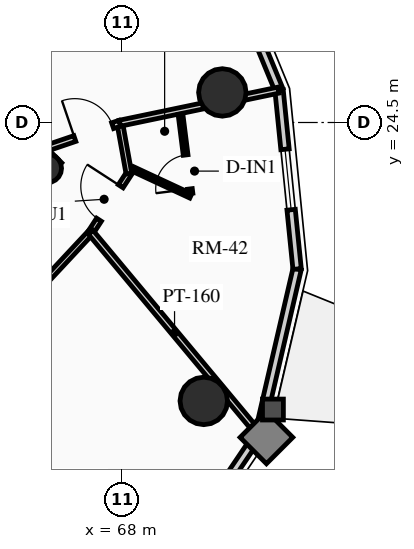
"""IFC4 building model, lengths in metres.
Left out: names, types, materials, properties, quantities, classifications, styles, units other than length and angle.
Written with IfcOpenShell. Run it as: python <this file> out.ifc"""

import sys

from ifc_helpers import new_model, si_unit, direction, frame, frame_2d, origin, origin_2d, place, context, subcontext, project, spatial, rectangle, circle, hollow_circle, extrude, source, transform, mapped, element, fill, save


model = new_model("IFC4")
c1 = context("Model", 3, precision=1e-05, world=origin(), true_north=direction((0.0, 1.0)))
c2 = subcontext(c1, "Body", "Model", "MODEL_VIEW")
j1 = project(units=[si_unit("LENGTHUNIT", "METRE"), si_unit("PLANEANGLEUNIT", "RADIAN")], contexts=[c1])
p1 = place(None, origin())
s1 = spatial("IfcSite", under=j1, at=p1, CompositionType="ELEMENT")
p2 = place(p1, origin())
s2 = spatial("IfcBuilding", under=s1, at=p2, CompositionType="ELEMENT")
p3 = place(p2, frame((0.0, 0.0, 169.06)))
s3 = spatial("IfcBuildingStorey", under=s2, at=p3, CompositionType="ELEMENT", Elevation=169.06)
p4 = place(p3, frame((66.268, 23.298, 0.0), z_axis=(0.0, 0.0, 1.0), x_axis=(-0.707106781187, 0.707106781187, 0.0)))
e1 = element("IfcWall", 1, at=p4, inside=s3, PredefinedType="SHEAR", context=c2, shape_type="SweptSolid", body=[
    extrude(rectangle(XDim=14.1, YDim=0.4, at=frame_2d((7.05, 0.0))), origin(), (0.0, 0.0, 1.0), 2.91),
])
p5 = place(p3, frame((58.561, 15.873, 0.0), z_axis=(0.0, 0.0, 1.0), x_axis=(0.707106781187, 0.707106781187, 0.0)))
e2 = element("IfcWall", 2, at=p5, inside=s3, PredefinedType="SHEAR", context=c2, shape_type="SweptSolid", body=[
    extrude(rectangle(XDim=10.7, YDim=0.4, at=frame_2d((5.35, 0.0))), origin(), (0.0, 0.0, 1.0), 2.91),
])
m1 = source(origin(), c2, "Body", "SweptSolid", [
    extrude(rectangle(XDim=1.5, YDim=2.02, at=frame_2d((0.75, 1.01))), frame((0.0, 0.21, 0.0), z_axis=(0.0, -1.0, 0.0), x_axis=(1.0, 0.0, 0.0)), (0.0, 0.0, 1.0), 0.42),
])
p6 = place(p5, frame((5.45, 0.0, 0.0)))
e3 = element("IfcOpeningElement", 3, at=p6, cuts=e2, PredefinedType="OPENING", context=c2, shape_type="MappedRepresentation", body=[
    mapped(m1, transform((0.0, 0.0, 0.0), x_axis=(1.0, 0.0, 0.0), y_axis=(0.0, 1.0, 0.0), z_axis=(0.0, 0.0, 1.0), scale=1.0)),
])
p7 = place(p3, frame((66.024, 23.294, 0.0), z_axis=(0.0, 0.0, 1.0), x_axis=(0.707106781187, 0.707106781187, 0.0)))
e4 = element("IfcColumn", 4, at=p7, inside=s3, PredefinedType="COLUMN", context=c2, shape_type="SweptSolid", body=[
    extrude(hollow_circle(Radius=0.38, WallThickness=0.032, at=origin_2d()), origin(), (0.0, 0.0, 1.0), 2.91),
])
for number, where, z_axis, x_axis in (
    (5, (70.146, 17.173, 0.0), (0.0, 0.0, 1.0), (1.0, 0.0, 0.0)),
    (6, (70.635, 25.291, 0.0), (0.0, 0.0, 1.0), (1.0, 0.0, 0.0)),
):
    element("IfcColumn", number, at=place(p3, frame(where, z_axis=z_axis, x_axis=x_axis)), inside=s3, PredefinedType="USERDEFINED", context=c2, shape_type="SweptSolid", body=[
        extrude(circle(Radius=0.625, at=origin_2d()), origin(), (0.0, 0.0, 1.0), 2.91),
    ])
p8 = place(p3, frame((71.6, 16.313, 0.0), z_axis=(0.0, 0.0, 1.0), x_axis=(-0.55951912514, -0.828817439852, 0.0)))
e7 = element("IfcWall", 7, at=p8, inside=s3, PredefinedType="SOLIDWALL", context=c2, shape_type="SweptSolid", body=[
    extrude(rectangle(XDim=4.259, YDim=0.22, at=frame_2d((2.129, 0.0))), origin(), (0.0, 0.0, 1.0), 2.245),
])
m2 = source(origin(), c2, "Body", "SweptSolid", [
    extrude(rectangle(XDim=1.6, YDim=1.3, at=frame_2d((0.8, 0.65))), frame((0.0, 0.12, 0.0), z_axis=(0.0, -1.0, 0.0), x_axis=(1.0, 0.0, 0.0)), (0.0, 0.0, 1.0), 0.24),
])
p9 = place(p8, frame((1.33, 0.0, 0.65)))
e8 = element("IfcOpeningElement", 8, at=p9, cuts=e7, PredefinedType="OPENING", context=c2, shape_type="MappedRepresentation", body=[
    mapped(m2, transform((0.0, 0.0, 0.0), x_axis=(1.0, 0.0, 0.0), y_axis=(0.0, 1.0, 0.0), z_axis=(0.0, 0.0, 1.0), scale=1.0)),
])
p10 = place(p3, frame((72.603, 20.645, 0.0), z_axis=(0.0, 0.0, 1.0), x_axis=(-0.22557328587, -0.97422620202, 0.0)))
e9 = element("IfcWall", 9, at=p10, inside=s3, PredefinedType="SOLIDWALL", context=c2, shape_type="SweptSolid", body=[
    extrude(rectangle(XDim=4.446, YDim=0.22, at=frame_2d((2.223, 0.0))), origin(), (0.0, 0.0, 1.0), 2.245),
])
p11 = place(p3, frame((72.127, 25.354, 0.0), z_axis=(0.0, 0.0, 1.0), x_axis=(0.100438356004, -0.994943283129, 0.0)))
e10 = element("IfcWall", 10, at=p11, inside=s3, PredefinedType="SOLIDWALL", context=c2, shape_type="SweptSolid", body=[
    extrude(rectangle(XDim=4.733, YDim=0.22, at=frame_2d((2.366, 0.0))), origin(), (0.0, 0.0, 1.0), 2.245),
])
p12 = place(p11, frame((1.566, 0.0, 0.65)))
e11 = element("IfcOpeningElement", 11, at=p12, cuts=e10, PredefinedType="OPENING", context=c2, shape_type="MappedRepresentation", body=[
    mapped(m2, transform((0.0, 0.0, 0.0), x_axis=(1.0, 0.0, 0.0), y_axis=(0.0, 1.0, 0.0), z_axis=(0.0, 0.0, 1.0), scale=1.0)),
])
p13 = place(p3, frame((70.22, 29.979, 0.0), z_axis=(0.0, 0.0, 1.0), x_axis=(0.381196434348, -0.924494066201, 0.0)))
e12 = element("IfcWall", 12, at=p13, inside=s3, PredefinedType="SOLIDWALL", context=c2, shape_type="SweptSolid", body=[
    extrude(rectangle(XDim=5.003, YDim=0.22, at=frame_2d((2.501, 0.0))), origin(), (0.0, 0.0, 1.0), 2.245),
])
p14 = place(p3, frame((62.756, 16.873, 0.0), z_axis=(0.0, 0.0, 1.0), x_axis=(0.682136885079, 0.73122450042, 0.0)))
e13 = element("IfcWall", 13, at=p14, inside=s3, PredefinedType="PARTITIONING", context=c2, shape_type="SweptSolid", body=[
    extrude(rectangle(XDim=6.476, YDim=0.15, at=frame_2d((3.238, 0.0))), origin(), (0.0, 0.0, 1.0), 2.245),
])
m3 = source(origin(), c2, "Body", "SweptSolid", [
    extrude(rectangle(XDim=1.05, YDim=2.015, at=frame_2d((0.525, 1.007))), frame((0.0, 0.085, 0.0), z_axis=(0.0, -1.0, 0.0), x_axis=(1.0, 0.0, 0.0)), (0.0, 0.0, 1.0), 0.17),
])
p15 = place(p14, frame((2.713, 0.0, 0.0)))
e14 = element("IfcOpeningElement", 14, at=p15, cuts=e13, PredefinedType="OPENING", context=c2, shape_type="MappedRepresentation", body=[
    mapped(m3, transform((0.0, 0.0, 0.0), x_axis=(1.0, 0.0, 0.0), y_axis=(0.0, 1.0, 0.0), z_axis=(0.0, 0.0, 1.0), scale=1.0)),
])
p16 = place(p3, frame((67.173, 21.608, 0.0), z_axis=(0.0, 0.0, 1.0), x_axis=(0.544299403682, 0.838891029367, 0.0)))
e15 = element("IfcWall", 15, at=p16, inside=s3, PredefinedType="PARTITIONING", context=c2, shape_type="SweptSolid", body=[
    extrude(rectangle(XDim=1.844, YDim=0.15, at=frame_2d((0.922, 0.0))), origin(), (0.0, 0.0, 1.0), 2.245),
])
p17 = place(p16, frame((0.397, 0.0, 0.0)))
e16 = element("IfcOpeningElement", 16, at=p17, cuts=e15, PredefinedType="OPENING", context=c2, shape_type="MappedRepresentation", body=[
    mapped(m3, transform((0.0, 0.0, 0.0), x_axis=(1.0, 0.0, 0.0), y_axis=(0.0, 1.0, 0.0), z_axis=(0.0, 0.0, 1.0), scale=1.0)),
])
p18 = place(p3, frame((68.177, 23.155, 0.0), z_axis=(0.0, 0.0, 1.0), x_axis=(-0.1778483434, 0.98405790823, 0.0)))
e17 = element("IfcWall", 17, at=p18, inside=s3, PredefinedType="PARTITIONING", context=c2, shape_type="SweptSolid", body=[
    extrude(rectangle(XDim=1.347, YDim=0.15, at=frame_2d((0.673, 0.0))), origin(), (0.0, 0.0, 1.0), 2.245),
])
p19 = place(p3, frame((67.173, 21.608, 0.0), z_axis=(0.0, 0.0, 1.0), x_axis=(0.64050880156, -0.767950828585, 0.0)))
e18 = element("IfcWall", 18, at=p19, inside=s3, PredefinedType="PARTITIONING", context=c2, shape_type="SweptSolid", body=[
    extrude(rectangle(XDim=6.883, YDim=0.16, at=frame_2d((3.441, 0.0))), origin(), (0.0, 0.0, 1.0), 2.245),
])
p20 = place(p3, frame((67.938, 24.48, 0.0), z_axis=(0.0, 0.0, 1.0), x_axis=(0.978917914143, 0.204254051051, 0.0)))
e19 = element("IfcWall", 19, at=p20, inside=s3, PredefinedType="PARTITIONING", context=c2, shape_type="SweptSolid", body=[
    extrude(rectangle(XDim=4.26, YDim=0.16, at=frame_2d((2.13, 0.0))), origin(), (0.0, 0.0, 1.0), 2.245),
])
p21 = place(p3, frame((66.021, 23.828, 0.0), z_axis=(0.0, 0.0, 1.0), x_axis=(0.946687463515, 0.32215345167, 0.0)))
e20 = element("IfcWall", 20, at=p21, inside=s3, PredefinedType="PARTITIONING", context=c2, shape_type="SweptSolid", body=[
    extrude(rectangle(XDim=2.025, YDim=0.16, at=frame_2d((1.012, 0.0))), origin(), (0.0, 0.0, 1.0), 2.245),
])
m4 = source(origin(), c2, "Body", "SweptSolid", [
    extrude(rectangle(XDim=1.05, YDim=2.015, at=frame_2d((0.525, 1.007))), frame((0.0, 0.09, 0.0), z_axis=(0.0, -1.0, 0.0), x_axis=(1.0, 0.0, 0.0)), (0.0, 0.0, 1.0), 0.18),
])
p22 = place(p21, frame((0.775, 0.0, 0.0)))
e21 = element("IfcOpeningElement", 21, at=p22, cuts=e20, PredefinedType="OPENING", context=c2, shape_type="MappedRepresentation", body=[
    mapped(m4, transform((0.0, 0.0, 0.0), x_axis=(1.0, 0.0, 0.0), y_axis=(0.0, 1.0, 0.0), z_axis=(0.0, 0.0, 1.0), scale=1.0)),
])
p23 = place(p3, frame((68.275, 23.28, 0.0), z_axis=(0.0, 0.0, 1.0), x_axis=(0.906681243062, -0.421816457099, 0.0)))
e22 = element("IfcWall", 22, at=p23, inside=s3, PredefinedType="PARTITIONING", context=c2, shape_type="SweptSolid", body=[
    extrude(rectangle(XDim=1.688, YDim=0.125, at=frame_2d((0.844, 0.0))), origin(), (0.0, 0.0, 1.0), 2.312),
])
p24 = place(p3, frame((69.797, 22.633, 0.0), z_axis=(0.0, 0.0, 1.0), x_axis=(-0.125234581717, 0.992127158958, 0.0)))
e23 = element("IfcWall", 23, at=p24, inside=s3, PredefinedType="PARTITIONING", context=c2, shape_type="SweptSolid", body=[
    extrude(rectangle(XDim=2.104, YDim=0.125, at=frame_2d((1.052, 0.0))), origin(), (0.0, 0.0, 1.0), 2.245),
])
m5 = source(origin(), c2, "Body", "SweptSolid", [
    extrude(rectangle(XDim=0.9, YDim=2.005, at=frame_2d((0.45, 1.002))), frame((0.0, 0.073, 0.0), z_axis=(0.0, -1.0, 0.0), x_axis=(1.0, 0.0, 0.0)), (0.0, 0.0, 1.0), 0.145),
])
p25 = place(p24, frame((0.12, 0.0, 0.0)))
e24 = element("IfcOpeningElement", 24, at=p25, cuts=e23, PredefinedType="OPENING", context=c2, shape_type="MappedRepresentation", body=[
    mapped(m5, transform((0.0, 0.0, 0.0), x_axis=(1.0, 0.0, 0.0), y_axis=(0.0, 1.0, 0.0), z_axis=(0.0, 0.0, 1.0), scale=1.0)),
])
m6 = source(origin(), c2, "Body", "SweptSolid", [
    extrude(rectangle(XDim=1.6, YDim=1.3, at=frame_2d((0.8, 0.65))), frame((0.0, 0.03, 0.0), z_axis=(0.0, -1.0, 0.0), x_axis=(1.0, 0.0, 0.0)), (0.0, 0.0, 1.0), 0.06),
])
p26 = place(p12, origin())
e25 = element("IfcWindow", 25, at=p26, inside=s3, PartitioningType="SINGLE_PANEL", PredefinedType="WINDOW", context=c2, shape_type="MappedRepresentation", body=[
    mapped(m6, transform((0.0, 0.0, 0.0), x_axis=(1.0, 0.0, 0.0), y_axis=(0.0, 1.0, 0.0), z_axis=(0.0, 0.0, 1.0), scale=1.0)),
])
fill(e11, e25)
m7 = source(origin(), c2, "Body", "SweptSolid", [
    extrude(rectangle(XDim=1.05, YDim=2.015, at=frame_2d((0.525, 1.007))), frame((0.0, 0.025, 0.0), z_axis=(0.0, -1.0, 0.0), x_axis=(1.0, 0.0, 0.0)), (0.0, 0.0, 1.0), 0.05),
])
p27 = place(p22, origin())
e26 = element("IfcDoor", 26, at=p27, inside=s3, OperationType="SINGLE_SWING_LEFT", PredefinedType="DOOR", context=c2, shape_type="MappedRepresentation", body=[
    mapped(m7, transform((0.0, 0.0, 0.0), x_axis=(1.0, 0.0, 0.0), y_axis=(0.0, 1.0, 0.0), z_axis=(0.0, 0.0, 1.0), scale=1.0)),
])
fill(e21, e26)
p28 = place(p17, origin())
e27 = element("IfcDoor", 27, at=p28, inside=s3, OperationType="SINGLE_SWING_RIGHT", PredefinedType="DOOR", context=c2, shape_type="MappedRepresentation", body=[
    mapped(m7, transform((0.0, 0.0, 0.0), x_axis=(1.0, 0.0, 0.0), y_axis=(0.0, 1.0, 0.0), z_axis=(0.0, 0.0, 1.0), scale=1.0)),
])
fill(e16, e27)
m8 = source(origin(), c2, "Body", "SweptSolid", [
    extrude(rectangle(XDim=0.9, YDim=2.005, at=frame_2d((0.45, 1.002))), frame((0.0, 0.025, 0.0), z_axis=(0.0, -1.0, 0.0), x_axis=(1.0, 0.0, 0.0)), (0.0, 0.0, 1.0), 0.05),
])
p29 = place(p25, origin())
e28 = element("IfcDoor", 28, at=p29, inside=s3, OperationType="SINGLE_SWING_LEFT", PredefinedType="DOOR", context=c2, shape_type="MappedRepresentation", body=[
    mapped(m8, transform((0.0, 0.0, 0.0), x_axis=(1.0, 0.0, 0.0), y_axis=(0.0, 1.0, 0.0), z_axis=(0.0, 0.0, 1.0), scale=1.0)),
])
fill(e24, e28)
save(model, sys.argv[1])
